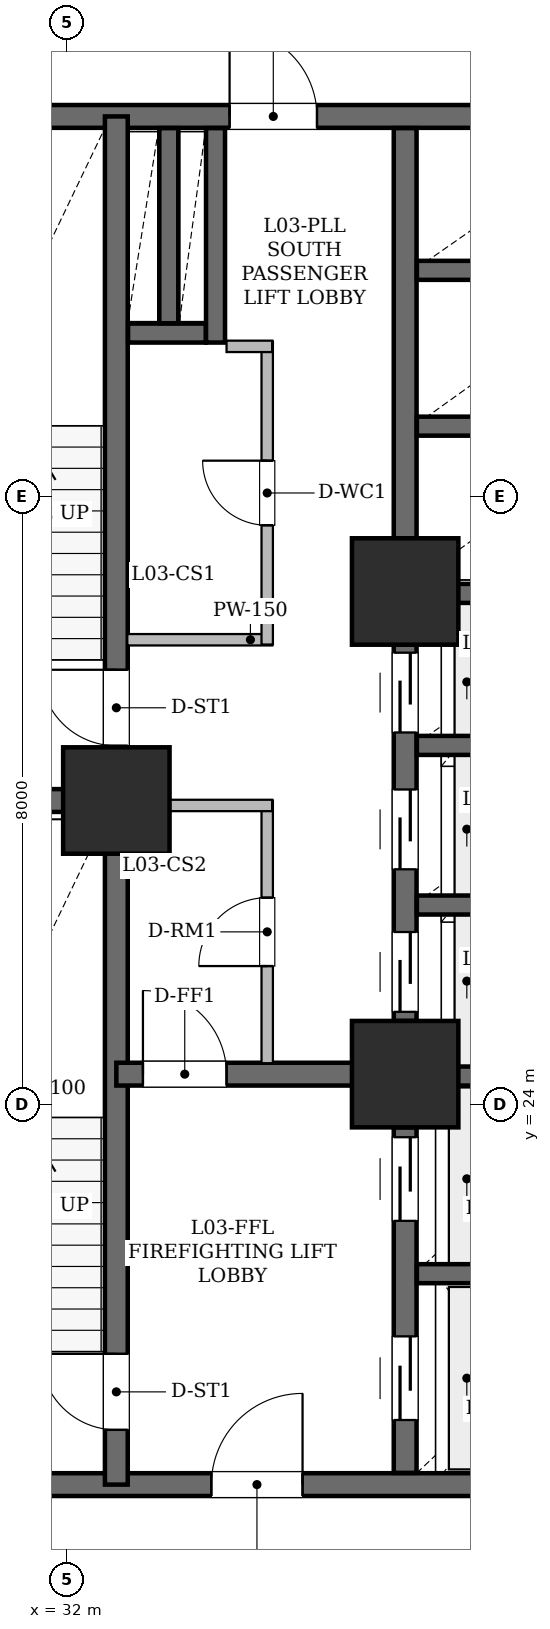
"""IFC4 building model, lengths in metres.
Left out: names, types, materials, properties, quantities, classifications, styles, units other than length and angle.
Written with IfcOpenShell. Run it as: python <this file> out.ifc"""

import sys

from ifc_helpers import new_model, si_unit, direction, frame, frame_2d, origin, origin_2d, place, context, subcontext, project, spatial, rectangle, hollow_rectangle, extrude, element, fill, save


model = new_model("IFC4")
c1 = context("Model", 3, precision=1e-05, world=origin(), true_north=direction((0.0, 1.0)))
c2 = subcontext(c1, "Body", "Model", "MODEL_VIEW")
j1 = project(units=[si_unit("LENGTHUNIT", "METRE"), si_unit("PLANEANGLEUNIT", "RADIAN")], contexts=[c1])
p1 = place(None, origin())
s1 = spatial("IfcSite", under=j1, at=p1, CompositionType="ELEMENT")
p2 = place(p1, origin())
s2 = spatial("IfcBuilding", under=s1, at=p2, CompositionType="ELEMENT")
p3 = place(p2, frame((0.0, 0.0, 16.2)))
s3 = spatial("IfcBuildingStorey", under=s2, at=p3, CompositionType="ELEMENT", Elevation=16.2)
for number, where, z_axis, x_axis in (
    (1, (32.65, 28.0, 0.0), (0.0, 0.0, 1.0), (1.0, 0.0, 0.0)),
    (2, (36.45, 24.4, 0.0), (0.0, 0.0, 1.0), (1.0, 0.0, 0.0)),
    (3, (36.45, 30.75, 0.0), (0.0, 0.0, 1.0), (1.0, 0.0, 0.0)),
):
    element("IfcColumn", number, at=place(p3, frame(where, z_axis=z_axis, x_axis=x_axis)), inside=s3, PredefinedType="COLUMN", context=c2, shape_type="SweptSolid", body=[
        extrude(hollow_rectangle(XDim=1.4, YDim=1.4, WallThickness=0.07, at=origin_2d()), origin(), (0.0, 0.0, 1.0), 4.2),
    ])
p4 = place(p3, frame((29.0, 19.0, 0.0), z_axis=(0.0, 0.0, 1.0), x_axis=(1.0, 0.0, 0.0)))
e4 = element("IfcWall", 4, at=p4, inside=s3, PredefinedType="SHEAR", context=c2, shape_type="SweptSolid", body=[
    extrude(rectangle(XDim=10.4, YDim=0.3, at=frame_2d((5.2, 0.0))), origin(), (0.0, 0.0, 1.0), 3.92),
])
p5 = place(p4, frame((4.9, 0.0, 0.0)))
e5 = element("IfcOpeningElement", 5, at=p5, cuts=e4, PredefinedType="OPENING", context=c2, shape_type="SweptSolid", body=[
    extrude(rectangle(XDim=1.2, YDim=2.15, at=frame_2d((0.6, 1.075))), frame((0.0, 0.16, 0.0), z_axis=(0.0, -1.0, 0.0), x_axis=(1.0, 0.0, 0.0)), (0.0, 0.0, 1.0), 0.32),
])
p6 = place(p3, frame((29.0, 37.0, 0.0), z_axis=(0.0, 0.0, 1.0), x_axis=(1.0, 0.0, 0.0)))
e6 = element("IfcWall", 6, at=p6, inside=s3, PredefinedType="SHEAR", context=c2, shape_type="SweptSolid", body=[
    extrude(rectangle(XDim=10.4, YDim=0.3, at=frame_2d((5.2, 0.0))), origin(), (0.0, 0.0, 1.0), 3.92),
])
p7 = place(p6, frame((5.14, 0.0, 0.0)))
e7 = element("IfcOpeningElement", 7, at=p7, cuts=e6, PredefinedType="OPENING", context=c2, shape_type="SweptSolid", body=[
    extrude(rectangle(XDim=1.15, YDim=2.2, at=frame_2d((0.575, 1.1))), frame((0.0, 0.16, 0.0), z_axis=(0.0, -1.0, 0.0), x_axis=(1.0, 0.0, 0.0)), (0.0, 0.0, 1.0), 0.32),
])
p8 = place(p3, frame((32.65, 19.0, 0.0), z_axis=(0.0, 0.0, 1.0), x_axis=(0.0, 1.0, 0.0)))
e8 = element("IfcWall", 8, at=p8, inside=s3, PredefinedType="SHEAR", context=c2, shape_type="SweptSolid", body=[
    extrude(rectangle(XDim=9.0, YDim=0.3, at=frame_2d((4.5, 0.0))), origin(), (0.0, 0.0, 1.0), 3.92),
])
p9 = place(p8, frame((0.72, 0.0, 0.0)))
e9 = element("IfcOpeningElement", 9, at=p9, cuts=e8, PredefinedType="OPENING", context=c2, shape_type="SweptSolid", body=[
    extrude(rectangle(XDim=1.0, YDim=2.15, at=frame_2d((0.5, 1.075))), frame((0.0, 0.16, 0.0), z_axis=(0.0, -1.0, 0.0), x_axis=(1.0, 0.0, 0.0)), (0.0, 0.0, 1.0), 0.32),
])
p10 = place(p3, frame((32.65, 28.0, 0.0), z_axis=(0.0, 0.0, 1.0), x_axis=(0.0, 1.0, 0.0)))
e10 = element("IfcWall", 10, at=p10, inside=s3, PredefinedType="SHEAR", context=c2, shape_type="SweptSolid", body=[
    extrude(rectangle(XDim=9.0, YDim=0.3, at=frame_2d((4.5, 0.0))), origin(), (0.0, 0.0, 1.0), 3.92),
])
p11 = place(p10, frame((0.72, 0.0, 0.0)))
e11 = element("IfcOpeningElement", 11, at=p11, cuts=e10, PredefinedType="OPENING", context=c2, shape_type="SweptSolid", body=[
    extrude(rectangle(XDim=1.0, YDim=2.15, at=frame_2d((0.5, 1.075))), frame((0.0, 0.16, 0.0), z_axis=(0.0, -1.0, 0.0), x_axis=(1.0, 0.0, 0.0)), (0.0, 0.0, 1.0), 0.32),
])
p12 = place(p3, frame((29.0, 28.0, 0.0), z_axis=(0.0, 0.0, 1.0), x_axis=(1.0, 0.0, 0.0)))
e12 = element("IfcWall", 12, at=p12, inside=s3, PredefinedType="SHEAR", context=c2, shape_type="SweptSolid", body=[
    extrude(rectangle(XDim=3.65, YDim=0.3, at=frame_2d((1.825, 0.0))), origin(), (0.0, 0.0, 1.0), 3.92),
])
p13 = place(p3, frame((32.65, 24.4, 0.0), z_axis=(0.0, 0.0, 1.0), x_axis=(1.0, 0.0, 0.0)))
e13 = element("IfcWall", 13, at=p13, inside=s3, PredefinedType="SHEAR", context=c2, shape_type="SweptSolid", body=[
    extrude(rectangle(XDim=3.8, YDim=0.3, at=frame_2d((1.9, 0.0))), origin(), (0.0, 0.0, 1.0), 3.92),
])
p14 = place(p13, frame((0.35, 0.0, 0.0)))
e14 = element("IfcOpeningElement", 14, at=p14, cuts=e13, PredefinedType="OPENING", context=c2, shape_type="SweptSolid", body=[
    extrude(rectangle(XDim=1.1, YDim=2.15, at=frame_2d((0.55, 1.075))), frame((0.0, 0.16, 0.0), z_axis=(0.0, -1.0, 0.0), x_axis=(1.0, 0.0, 0.0)), (0.0, 0.0, 1.0), 0.32),
])
p15 = place(p3, frame((36.45, 19.154, 0.0), z_axis=(0.0, 0.0, 1.0), x_axis=(0.0, 1.0, 0.0)))
e15 = element("IfcWall", 15, at=p15, inside=s3, PredefinedType="SHEAR", context=c2, shape_type="SweptSolid", body=[
    extrude(rectangle(XDim=4.546, YDim=0.3, at=frame_2d((2.273, 0.0))), origin(), (0.0, 0.0, 1.0), 3.92),
])
p16 = place(p15, frame((0.696, 0.0, 0.0)))
e16 = element("IfcOpeningElement", 16, at=p16, cuts=e15, PredefinedType="OPENING", context=c2, shape_type="SweptSolid", body=[
    extrude(rectangle(XDim=1.1, YDim=2.15, at=frame_2d((0.55, 1.075))), frame((0.0, 0.16, 0.0), z_axis=(0.0, -1.0, 0.0), x_axis=(1.0, 0.0, 0.0)), (0.0, 0.0, 1.0), 0.32),
])
p17 = place(p15, frame((3.316, 0.0, 0.0)))
e17 = element("IfcOpeningElement", 17, at=p17, cuts=e15, PredefinedType="OPENING", context=c2, shape_type="SweptSolid", body=[
    extrude(rectangle(XDim=1.1, YDim=2.15, at=frame_2d((0.55, 1.075))), frame((0.0, 0.16, 0.0), z_axis=(0.0, -1.0, 0.0), x_axis=(1.0, 0.0, 0.0)), (0.0, 0.0, 1.0), 0.32),
])
p18 = place(p3, frame((36.45, 25.1, 0.0), z_axis=(0.0, 0.0, 1.0), x_axis=(0.0, 1.0, 0.0)))
e18 = element("IfcWall", 18, at=p18, inside=s3, PredefinedType="SHEAR", context=c2, shape_type="SweptSolid", body=[
    extrude(rectangle(XDim=4.95, YDim=0.3, at=frame_2d((2.475, 0.0))), origin(), (0.0, 0.0, 1.0), 3.92),
])
p19 = place(p18, frame((0.12, 0.0, 0.0)))
e19 = element("IfcOpeningElement", 19, at=p19, cuts=e18, PredefinedType="OPENING", context=c2, shape_type="SweptSolid", body=[
    extrude(rectangle(XDim=1.05, YDim=2.15, at=frame_2d((0.525, 1.075))), frame((0.0, 0.16, 0.0), z_axis=(0.0, -1.0, 0.0), x_axis=(1.0, 0.0, 0.0)), (0.0, 0.0, 1.0), 0.32),
])
p20 = place(p18, frame((1.995, 0.0, 0.0)))
e20 = element("IfcOpeningElement", 20, at=p20, cuts=e18, PredefinedType="OPENING", context=c2, shape_type="SweptSolid", body=[
    extrude(rectangle(XDim=1.05, YDim=2.15, at=frame_2d((0.525, 1.075))), frame((0.0, 0.16, 0.0), z_axis=(0.0, -1.0, 0.0), x_axis=(1.0, 0.0, 0.0)), (0.0, 0.0, 1.0), 0.32),
])
p21 = place(p18, frame((3.795, 0.0, 0.0)))
e21 = element("IfcOpeningElement", 21, at=p21, cuts=e18, PredefinedType="OPENING", context=c2, shape_type="SweptSolid", body=[
    extrude(rectangle(XDim=1.05, YDim=2.15, at=frame_2d((0.525, 1.075))), frame((0.0, 0.16, 0.0), z_axis=(0.0, -1.0, 0.0), x_axis=(1.0, 0.0, 0.0)), (0.0, 0.0, 1.0), 0.32),
])
p22 = place(p3, frame((36.45, 31.45, 0.0), z_axis=(0.0, 0.0, 1.0), x_axis=(0.0, 1.0, 0.0)))
e22 = element("IfcWall", 22, at=p22, inside=s3, PredefinedType="SHEAR", context=c2, shape_type="SweptSolid", body=[
    extrude(rectangle(XDim=5.396, YDim=0.3, at=frame_2d((2.698, 0.0))), origin(), (0.0, 0.0, 1.0), 3.92),
])
for number, where, z_axis, x_axis in (
    (23, (36.604, 21.775, 0.0), (0.0, 0.0, 1.0), (1.0, 0.0, 0.0)),
    (24, (36.604, 24.375, 0.0), (0.0, 0.0, 1.0), (1.0, 0.0, 0.0)),
    (25, (36.604, 26.625, 0.0), (0.0, 0.0, 1.0), (1.0, 0.0, 0.0)),
    (26, (36.604, 28.725, 0.0), (0.0, 0.0, 1.0), (1.0, 0.0, 0.0)),
    (27, (36.604, 30.725, 0.0), (0.0, 0.0, 1.0), (1.0, 0.0, 0.0)),
    (28, (36.604, 32.925, 0.0), (0.0, 0.0, 1.0), (1.0, 0.0, 0.0)),
    (29, (36.604, 34.975, 0.0), (0.0, 0.0, 1.0), (1.0, 0.0, 0.0)),
):
    element("IfcWall", number, at=place(p3, frame(where, z_axis=z_axis, x_axis=x_axis)), inside=s3, PredefinedType="SHEAR", context=c2, shape_type="SweptSolid", body=[
        extrude(rectangle(XDim=2.642, YDim=0.25, at=frame_2d((1.321, 0.0))), origin(), (0.0, 0.0, 1.0), 3.92),
    ])
p23 = place(p3, frame((33.955, 34.025, 0.0), z_axis=(0.0, 0.0, 1.0), x_axis=(0.0, 1.0, 0.0)))
e30 = element("IfcWall", 30, at=p23, inside=s3, PredefinedType="SHEAR", context=c2, shape_type="SweptSolid", body=[
    extrude(rectangle(XDim=2.821, YDim=0.25, at=frame_2d((1.411, 0.0))), origin(), (0.0, 0.0, 1.0), 3.92),
])
p24 = place(p3, frame((32.804, 34.15, 0.0), z_axis=(0.0, 0.0, 1.0), x_axis=(1.0, 0.0, 0.0)))
e31 = element("IfcWall", 31, at=p24, inside=s3, PredefinedType="SHEAR", context=c2, shape_type="SweptSolid", body=[
    extrude(rectangle(XDim=1.022, YDim=0.25, at=frame_2d((0.511, 0.0))), origin(), (0.0, 0.0, 1.0), 3.92),
])
p25 = place(p3, frame((33.34, 34.279, 0.0), z_axis=(0.0, 0.0, 1.0), x_axis=(0.0, 1.0, 0.0)))
e32 = element("IfcWall", 32, at=p25, inside=s3, PredefinedType="SHEAR", context=c2, shape_type="SweptSolid", body=[
    extrude(rectangle(XDim=2.567, YDim=0.25, at=frame_2d((1.283, 0.0))), origin(), (0.0, 0.0, 1.0), 3.92),
])
p26 = place(p3, frame((32.794, 30.115, 0.0), z_axis=(0.0, 0.0, 1.0), x_axis=(1.0, 0.0, 0.0)))
e33 = element("IfcWall", 33, at=p26, inside=s3, PredefinedType="STANDARD", context=c2, shape_type="SweptSolid", body=[
    extrude(rectangle(XDim=1.906, YDim=0.15, at=frame_2d((0.953, 0.0))), origin(), (0.0, 0.0, 1.0), 3.377),
])
p27 = place(p3, frame((34.635, 30.052, 0.0), z_axis=(0.0, 0.0, 1.0), x_axis=(0.0, 1.0, 0.0)))
e34 = element("IfcWall", 34, at=p27, inside=s3, PredefinedType="STANDARD", context=c2, shape_type="SweptSolid", body=[
    extrude(rectangle(XDim=3.988, YDim=0.15, at=frame_2d((1.994, 0.0))), origin(), (0.0, 0.0, 1.0), 3.92),
])
p28 = place(p27, frame((1.569, 0.0, 0.0)))
e35 = element("IfcOpeningElement", 35, at=p28, cuts=e34, PredefinedType="OPENING", context=c2, shape_type="SweptSolid", body=[
    extrude(rectangle(XDim=0.85, YDim=2.1, at=frame_2d((0.425, 1.05))), frame((0.0, 0.085, 0.0), z_axis=(0.0, -1.0, 0.0), x_axis=(1.0, 0.0, 0.0)), (0.0, 0.0, 1.0), 0.17),
])
p29 = place(p3, frame((34.7, 33.975, 0.0), z_axis=(0.0, 0.0, 1.0), x_axis=(-1.0, 0.0, 0.0)))
e36 = element("IfcWall", 36, at=p29, inside=s3, PredefinedType="STANDARD", context=c2, shape_type="SweptSolid", body=[
    extrude(rectangle(XDim=0.6, YDim=0.15, at=frame_2d((0.3, 0.0))), origin(), (0.0, 0.0, 1.0), 3.92),
])
p30 = place(p3, frame((34.635, 24.544, 0.0), z_axis=(0.0, 0.0, 1.0), x_axis=(0.0, 1.0, 0.0)))
e37 = element("IfcWall", 37, at=p30, inside=s3, PredefinedType="STANDARD", context=c2, shape_type="SweptSolid", body=[
    extrude(rectangle(XDim=3.456, YDim=0.15, at=frame_2d((1.728, 0.0))), origin(), (0.0, 0.0, 1.0), 3.92),
])
p31 = place(p30, frame((1.278, 0.0, 0.0)))
e38 = element("IfcOpeningElement", 38, at=p31, cuts=e37, PredefinedType="OPENING", context=c2, shape_type="SweptSolid", body=[
    extrude(rectangle(XDim=0.9, YDim=2.1, at=frame_2d((0.45, 1.05))), frame((0.0, 0.085, 0.0), z_axis=(0.0, -1.0, 0.0), x_axis=(1.0, 0.0, 0.0)), (0.0, 0.0, 1.0), 0.17),
])
p32 = place(p3, frame((34.7, 27.935, 0.0), z_axis=(0.0, 0.0, 1.0), x_axis=(-1.0, 0.0, 0.0)))
e39 = element("IfcWall", 39, at=p32, inside=s3, PredefinedType="STANDARD", context=c2, shape_type="SweptSolid", body=[
    extrude(rectangle(XDim=1.906, YDim=0.15, at=frame_2d((0.953, 0.0))), origin(), (0.0, 0.0, 1.0), 3.377),
])
p33 = place(p9, origin())
e40 = element("IfcDoor", 40, at=p33, inside=s3, OperationType="SINGLE_SWING_RIGHT", PredefinedType="DOOR", context=c2, shape_type="SweptSolid", body=[
    extrude(rectangle(XDim=1.0, YDim=2.15, at=frame_2d((0.5, 1.075))), frame((0.0, 0.025, 0.0), z_axis=(0.0, -1.0, 0.0), x_axis=(1.0, 0.0, 0.0)), (0.0, 0.0, 1.0), 0.05),
])
fill(e9, e40)
p34 = place(p11, origin())
e41 = element("IfcDoor", 41, at=p34, inside=s3, OperationType="SINGLE_SWING_RIGHT", PredefinedType="DOOR", context=c2, shape_type="SweptSolid", body=[
    extrude(rectangle(XDim=1.0, YDim=2.15, at=frame_2d((0.5, 1.075))), frame((0.0, 0.025, 0.0), z_axis=(0.0, -1.0, 0.0), x_axis=(1.0, 0.0, 0.0)), (0.0, 0.0, 1.0), 0.05),
])
fill(e11, e41)
p35 = place(p14, origin())
e42 = element("IfcDoor", 42, at=p35, inside=s3, OperationType="SINGLE_SWING_LEFT", PredefinedType="DOOR", context=c2, shape_type="SweptSolid", body=[
    extrude(rectangle(XDim=1.1, YDim=2.15, at=frame_2d((0.55, 1.075))), frame((0.0, 0.025, 0.0), z_axis=(0.0, -1.0, 0.0), x_axis=(1.0, 0.0, 0.0)), (0.0, 0.0, 1.0), 0.05),
])
fill(e14, e42)
p36 = place(p5, origin())
e43 = element("IfcDoor", 43, at=p36, inside=s3, OperationType="SINGLE_SWING_RIGHT", PredefinedType="DOOR", context=c2, shape_type="SweptSolid", body=[
    extrude(rectangle(XDim=1.2, YDim=2.15, at=frame_2d((0.6, 1.075))), frame((0.0, 0.025, 0.0), z_axis=(0.0, -1.0, 0.0), x_axis=(1.0, 0.0, 0.0)), (0.0, 0.0, 1.0), 0.05),
])
fill(e5, e43)
p37 = place(p7, origin())
e44 = element("IfcDoor", 44, at=p37, inside=s3, OperationType="SINGLE_SWING_LEFT", PredefinedType="DOOR", context=c2, shape_type="SweptSolid", body=[
    extrude(rectangle(XDim=1.15, YDim=2.2, at=frame_2d((0.575, 1.1))), frame((0.0, 0.025, 0.0), z_axis=(0.0, -1.0, 0.0), x_axis=(1.0, 0.0, 0.0)), (0.0, 0.0, 1.0), 0.05),
])
fill(e7, e44)
p38 = place(p16, origin())
e45 = element("IfcDoor", 45, at=p38, inside=s3, OperationType="SLIDING_TO_LEFT", PredefinedType="DOOR", context=c2, shape_type="SweptSolid", body=[
    extrude(rectangle(XDim=1.1, YDim=2.15, at=frame_2d((0.55, 1.075))), frame((0.0, 0.025, 0.0), z_axis=(0.0, -1.0, 0.0), x_axis=(1.0, 0.0, 0.0)), (0.0, 0.0, 1.0), 0.05),
])
fill(e16, e45)
p39 = place(p17, origin())
e46 = element("IfcDoor", 46, at=p39, inside=s3, OperationType="SLIDING_TO_LEFT", PredefinedType="DOOR", context=c2, shape_type="SweptSolid", body=[
    extrude(rectangle(XDim=1.1, YDim=2.15, at=frame_2d((0.55, 1.075))), frame((0.0, 0.025, 0.0), z_axis=(0.0, -1.0, 0.0), x_axis=(1.0, 0.0, 0.0)), (0.0, 0.0, 1.0), 0.05),
])
fill(e17, e46)
p40 = place(p19, origin())
e47 = element("IfcDoor", 47, at=p40, inside=s3, OperationType="SLIDING_TO_LEFT", PredefinedType="DOOR", context=c2, shape_type="SweptSolid", body=[
    extrude(rectangle(XDim=1.05, YDim=2.15, at=frame_2d((0.525, 1.075))), frame((0.0, 0.025, 0.0), z_axis=(0.0, -1.0, 0.0), x_axis=(1.0, 0.0, 0.0)), (0.0, 0.0, 1.0), 0.05),
])
fill(e19, e47)
p41 = place(p20, origin())
e48 = element("IfcDoor", 48, at=p41, inside=s3, OperationType="SLIDING_TO_LEFT", PredefinedType="DOOR", context=c2, shape_type="SweptSolid", body=[
    extrude(rectangle(XDim=1.05, YDim=2.15, at=frame_2d((0.525, 1.075))), frame((0.0, 0.025, 0.0), z_axis=(0.0, -1.0, 0.0), x_axis=(1.0, 0.0, 0.0)), (0.0, 0.0, 1.0), 0.05),
])
fill(e20, e48)
p42 = place(p21, origin())
e49 = element("IfcDoor", 49, at=p42, inside=s3, OperationType="SLIDING_TO_LEFT", PredefinedType="DOOR", context=c2, shape_type="SweptSolid", body=[
    extrude(rectangle(XDim=1.05, YDim=2.15, at=frame_2d((0.525, 1.075))), frame((0.0, 0.025, 0.0), z_axis=(0.0, -1.0, 0.0), x_axis=(1.0, 0.0, 0.0)), (0.0, 0.0, 1.0), 0.05),
])
fill(e21, e49)
p43 = place(p28, origin())
e50 = element("IfcDoor", 50, at=p43, inside=s3, OperationType="SINGLE_SWING_RIGHT", PredefinedType="DOOR", context=c2, shape_type="SweptSolid", body=[
    extrude(rectangle(XDim=0.85, YDim=2.1, at=frame_2d((0.425, 1.05))), frame((0.0, 0.025, 0.0), z_axis=(0.0, -1.0, 0.0), x_axis=(1.0, 0.0, 0.0)), (0.0, 0.0, 1.0), 0.05),
])
fill(e35, e50)
p44 = place(p31, origin())
e51 = element("IfcDoor", 51, at=p44, inside=s3, OperationType="SINGLE_SWING_LEFT", PredefinedType="DOOR", context=c2, shape_type="SweptSolid", body=[
    extrude(rectangle(XDim=0.9, YDim=2.1, at=frame_2d((0.45, 1.05))), frame((0.0, 0.025, 0.0), z_axis=(0.0, -1.0, 0.0), x_axis=(1.0, 0.0, 0.0)), (0.0, 0.0, 1.0), 0.05),
])
fill(e38, e51)
save(model, sys.argv[1])
